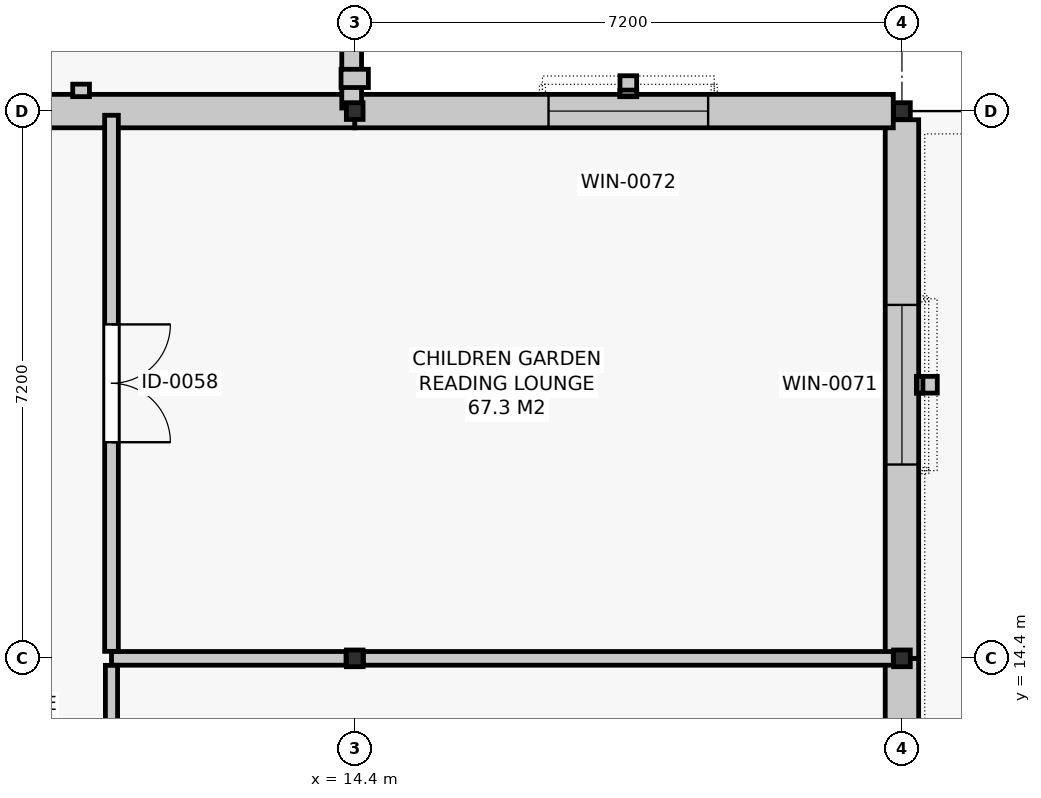
"""IFC4 building model, lengths in metres.
Left out: names, types, materials, properties, quantities, classifications, styles, units other than length and angle.
Written with IfcOpenShell. Run it as: python <this file> out.ifc"""

import sys

from ifc_helpers import new_model, si_unit, direction, frame, frame_2d, origin, origin_2d, place, context, subcontext, project, spatial, rectangle, i_section, extrude, element, fill, save


model = new_model("IFC4")
c1 = context("Model", 3, precision=1e-05, world=origin(), true_north=direction((0.0, 1.0)))
c2 = subcontext(c1, "Body", "Model", "MODEL_VIEW")
j1 = project(units=[si_unit("LENGTHUNIT", "METRE"), si_unit("PLANEANGLEUNIT", "RADIAN")], contexts=[c1])
p1 = place(None, origin())
s1 = spatial("IfcSite", under=j1, at=p1, CompositionType="ELEMENT")
p2 = place(p1, origin())
s2 = spatial("IfcBuilding", under=s1, at=p2, CompositionType="ELEMENT")
p3 = place(p2, frame((0.0, 0.0, 10.2)))
s3 = spatial("IfcBuildingStorey", under=s2, at=p3, CompositionType="ELEMENT", Elevation=10.2)
for number, where, z_axis, x_axis in (
    (1, (14.4, 14.4, 0.0), (0.0, 0.0, 1.0), (1.0, 0.0, 0.0)),
    (2, (14.4, 21.6, 0.0), (0.0, 0.0, 1.0), (1.0, 0.0, 0.0)),
    (3, (21.6, 14.4, 0.0), (0.0, 0.0, 1.0), (1.0, 0.0, 0.0)),
    (4, (21.6, 21.6, 0.0), (0.0, 0.0, 1.0), (1.0, 0.0, 0.0)),
):
    element("IfcColumn", number, at=place(p3, frame(where, z_axis=z_axis, x_axis=x_axis)), inside=s3, PredefinedType="COLUMN", context=c2, shape_type="SweptSolid", body=[
        extrude(i_section(OverallWidth=0.22, OverallDepth=0.22, WebThickness=0.01, FlangeThickness=0.016, FilletRadius=0.018, at=origin_2d()), origin(), (0.0, 0.0, 1.0), 4.2),
    ])
p4 = place(p3, frame((21.6, 7.2, 0.0), z_axis=(0.0, 0.0, 1.0), x_axis=(0.0, 1.0, 0.0)))
e5 = element("IfcWall", 5, at=p4, inside=s3, PredefinedType="SOLIDWALL", context=c2, shape_type="SweptSolid", body=[
    extrude(rectangle(XDim=7.2, YDim=0.44, at=frame_2d((3.6, 0.0))), origin(), (0.0, 0.0, 1.0), 3.24),
])
p5 = place(p4, frame((3.05, 0.0, 0.0)))
e6 = element("IfcOpeningElement", 6, at=p5, cuts=e5, PredefinedType="OPENING", context=c2, shape_type="SweptSolid", body=[
    extrude(rectangle(XDim=1.1, YDim=2.2, at=frame_2d((0.55, 1.1))), frame((0.0, 0.232, 0.0), z_axis=(0.0, -1.0, 0.0), x_axis=(1.0, 0.0, 0.0)), (0.0, 0.0, 1.0), 0.464),
])
p6 = place(p3, frame((21.6, 14.4, 0.0), z_axis=(0.0, 0.0, 1.0), x_axis=(0.0, 1.0, 0.0)))
e7 = element("IfcWall", 7, at=p6, inside=s3, PredefinedType="SOLIDWALL", context=c2, shape_type="SweptSolid", body=[
    extrude(rectangle(XDim=7.086, YDim=0.44, at=frame_2d((3.543, 0.0))), origin(), (0.0, 0.0, 1.0), 3.24),
])
p7 = place(p6, frame((2.55, 0.0, 0.9)))
e8 = element("IfcOpeningElement", 8, at=p7, cuts=e7, PredefinedType="OPENING", context=c2, shape_type="SweptSolid", body=[
    extrude(rectangle(XDim=2.1, YDim=2.1, at=frame_2d((1.05, 1.05))), frame((0.0, 0.232, 0.0), z_axis=(0.0, -1.0, 0.0), x_axis=(1.0, 0.0, 0.0)), (0.0, 0.0, 1.0), 0.464),
])
p8 = place(p3, frame((21.486, 21.6, 0.0), z_axis=(0.0, 0.0, 1.0), x_axis=(-1.0, 0.0, 0.0)))
e9 = element("IfcWall", 9, at=p8, inside=s3, PredefinedType="SOLIDWALL", context=c2, shape_type="SweptSolid", body=[
    extrude(rectangle(XDim=7.086, YDim=0.44, at=frame_2d((3.543, 0.0))), origin(), (0.0, 0.0, 1.0), 3.24),
])
p9 = place(p8, frame((2.436, 0.0, 0.9)))
e10 = element("IfcOpeningElement", 10, at=p9, cuts=e9, PredefinedType="OPENING", context=c2, shape_type="SweptSolid", body=[
    extrude(rectangle(XDim=2.1, YDim=2.1, at=frame_2d((1.05, 1.05))), frame((0.0, 0.232, 0.0), z_axis=(0.0, -1.0, 0.0), x_axis=(1.0, 0.0, 0.0)), (0.0, 0.0, 1.0), 0.464),
])
p10 = place(p3, frame((14.4, 21.6, 0.0), z_axis=(0.0, 0.0, 1.0), x_axis=(-1.0, 0.0, 0.0)))
e11 = element("IfcWall", 11, at=p10, inside=s3, PredefinedType="SOLIDWALL", context=c2, shape_type="SweptSolid", body=[
    extrude(rectangle(XDim=7.2, YDim=0.44, at=frame_2d((3.6, 0.0))), origin(), (0.0, 0.0, 1.0), 3.24),
])
p11 = place(p3, frame((14.36, 21.64, 0.0), z_axis=(0.0, 0.0, 1.0), x_axis=(0.0, 1.0, 0.0)))
e12 = element("IfcWall", 12, at=p11, inside=s3, PredefinedType="PARAPET", context=c2, shape_type="SweptSolid", body=[
    extrude(rectangle(XDim=7.12, YDim=0.26, at=frame_2d((3.56, 0.0))), origin(), (0.0, 0.0, 1.0), 0.9),
])
p12 = place(p3, frame((11.2, 14.4, 0.0), z_axis=(0.0, 0.0, 1.0), x_axis=(1.0, 0.0, 0.0)))
e13 = element("IfcWall", 13, at=p12, inside=s3, PredefinedType="PARTITIONING", context=c2, shape_type="SweptSolid", body=[
    extrude(rectangle(XDim=3.086, YDim=0.18, at=frame_2d((1.543, 0.0))), origin(), (0.0, 0.0, 1.0), 3.595),
])
p13 = place(p3, frame((14.514, 14.4, 0.0), z_axis=(0.0, 0.0, 1.0), x_axis=(1.0, 0.0, 0.0)))
e14 = element("IfcWall", 14, at=p13, inside=s3, PredefinedType="PARTITIONING", context=c2, shape_type="SweptSolid", body=[
    extrude(rectangle(XDim=6.972, YDim=0.18, at=frame_2d((3.486, 0.0))), origin(), (0.0, 0.0, 1.0), 3.595),
])
p14 = place(p3, frame((11.2, 14.492, 0.0), z_axis=(0.0, 0.0, 1.0), x_axis=(0.0, 1.0, 0.0)))
e15 = element("IfcWall", 15, at=p14, inside=s3, PredefinedType="PARTITIONING", context=c2, shape_type="SweptSolid", body=[
    extrude(rectangle(XDim=7.053, YDim=0.18, at=frame_2d((3.526, 0.0))), origin(), (0.0, 0.0, 1.0), 3.395),
])
p15 = place(p14, frame((2.751, 0.0, 0.0)))
e16 = element("IfcOpeningElement", 16, at=p15, cuts=e15, PredefinedType="OPENING", context=c2, shape_type="SweptSolid", body=[
    extrude(rectangle(XDim=1.55, YDim=2.2, at=frame_2d((0.775, 1.1))), frame((0.0, 0.102, 0.0), z_axis=(0.0, -1.0, 0.0), x_axis=(1.0, 0.0, 0.0)), (0.0, 0.0, 1.0), 0.204),
])
p16 = place(p3, frame((11.2, 7.282, 0.0), z_axis=(0.0, 0.0, 1.0), x_axis=(0.0, 1.0, 0.0)))
e17 = element("IfcWall", 17, at=p16, inside=s3, PredefinedType="PARTITIONING", context=c2, shape_type="SweptSolid", body=[
    extrude(rectangle(XDim=7.026, YDim=0.16, at=frame_2d((3.513, 0.0))), origin(), (0.0, 0.0, 1.0), 3.645),
])
p17 = place(p16, frame((3.013, 0.0, 0.0)))
e18 = element("IfcOpeningElement", 18, at=p17, cuts=e17, PredefinedType="OPENING", context=c2, shape_type="SweptSolid", body=[
    extrude(rectangle(XDim=1.0, YDim=2.15, at=frame_2d((0.5, 1.075))), frame((0.0, 0.092, 0.0), z_axis=(0.0, -1.0, 0.0), x_axis=(1.0, 0.0, 0.0)), (0.0, 0.0, 1.0), 0.184),
])
p18 = place(p7, origin())
e19 = element("IfcWindow", 19, at=p18, inside=s3, PartitioningType="SINGLE_PANEL", PredefinedType="WINDOW", context=c2, shape_type="SweptSolid", body=[
    extrude(rectangle(XDim=2.1, YDim=2.1, at=frame_2d((1.05, 1.05))), frame((0.0, 0.03, 0.0), z_axis=(0.0, -1.0, 0.0), x_axis=(1.0, 0.0, 0.0)), (0.0, 0.0, 1.0), 0.06),
])
fill(e8, e19)
p19 = place(p9, origin())
e20 = element("IfcWindow", 20, at=p19, inside=s3, PartitioningType="SINGLE_PANEL", PredefinedType="WINDOW", context=c2, shape_type="SweptSolid", body=[
    extrude(rectangle(XDim=2.1, YDim=2.1, at=frame_2d((1.05, 1.05))), frame((0.0, 0.03, 0.0), z_axis=(0.0, -1.0, 0.0), x_axis=(1.0, 0.0, 0.0)), (0.0, 0.0, 1.0), 0.06),
])
fill(e10, e20)
p20 = place(p15, frame((1.55, 0.0, 0.0), z_axis=(0.0, 0.0, 1.0), x_axis=(-1.0, 0.0, 0.0)))
e21 = element("IfcDoor", 21, at=p20, inside=s3, OperationType="DOUBLE_DOOR_SINGLE_SWING", PredefinedType="DOOR", context=c2, shape_type="SweptSolid", body=[
    extrude(rectangle(XDim=1.55, YDim=2.2, at=frame_2d((0.775, 1.1))), frame((0.0, 0.025, 0.0), z_axis=(0.0, -1.0, 0.0), x_axis=(1.0, 0.0, 0.0)), (0.0, 0.0, 1.0), 0.05),
])
fill(e16, e21)
save(model, sys.argv[1])
